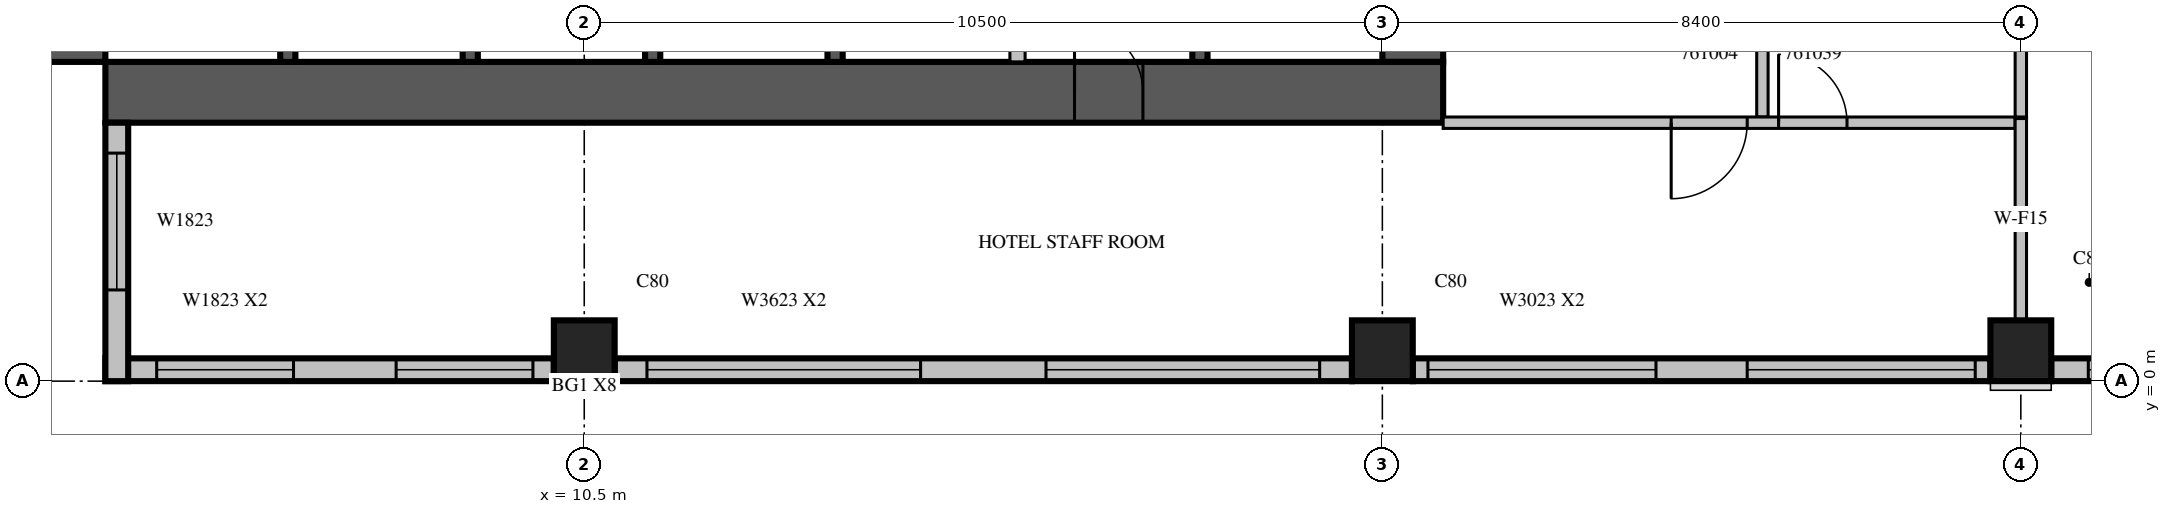
"""IFC4 building model, lengths in metres.
Left out: names, types, materials, properties, quantities, classifications, styles, units other than length and angle.
Written with IfcOpenShell. Run it as: python <this file> out.ifc"""

import sys

from ifc_helpers import new_model, si_unit, direction, frame, frame_2d, origin, origin_2d, place, context, subcontext, project, spatial, rectangle, extrude, source, transform, mapped, element, fill, save


model = new_model("IFC4")
c1 = context("Model", 3, precision=1e-05, world=origin(), true_north=direction((0.0, 1.0)))
c2 = subcontext(c1, "Body", "Model", "MODEL_VIEW")
j1 = project(units=[si_unit("LENGTHUNIT", "METRE"), si_unit("PLANEANGLEUNIT", "RADIAN")], contexts=[c1])
p1 = place(None, origin())
s1 = spatial("IfcSite", under=j1, at=p1, CompositionType="ELEMENT")
p2 = place(p1, origin())
s2 = spatial("IfcBuilding", under=s1, at=p2, CompositionType="ELEMENT")
p3 = place(p2, frame((0.0, 0.0, 265.2)))
s3 = spatial("IfcBuildingStorey", under=s2, at=p3, CompositionType="ELEMENT", Elevation=265.2)
m1 = source(origin(), c2, "Body", "SweptSolid", [
    extrude(rectangle(XDim=0.8, YDim=0.8, at=origin_2d()), origin(), (0.0, 0.0, 1.0), 3.8),
])
for number, where, z_axis, x_axis in (
    (1, (10.5, 0.4, 0.0), (0.0, 0.0, 1.0), (1.0, 0.0, 0.0)),
    (2, (21.0, 0.4, 0.0), (0.0, 0.0, 1.0), (1.0, 0.0, 0.0)),
    (3, (29.4, 0.4, 0.0), (0.0, 0.0, 1.0), (1.0, 0.0, 0.0)),
):
    element("IfcColumn", number, at=place(p3, frame(where, z_axis=z_axis, x_axis=x_axis)), inside=s3, PredefinedType="COLUMN", context=c2, shape_type="MappedRepresentation", body=[
        mapped(m1, transform((0.0, 0.0, 0.0), scale=1.0)),
    ])
m2 = source(origin(), c2, "Body", "SweptSolid", [
    extrude(rectangle(XDim=17.6, YDim=0.8, at=frame_2d((8.8, 0.0))), origin(), (0.0, 0.0, 1.0), 3.8),
])
p4 = place(p3, frame((3.8, 4.2, 0.0), z_axis=(0.0, 0.0, 1.0), x_axis=(0.0, 1.0, 0.0)))
e4 = element("IfcWall", 4, at=p4, inside=s3, PredefinedType="SHEAR", context=c2, shape_type="MappedRepresentation", body=[
    mapped(m2, transform((0.0, 0.0, 0.0), scale=1.0)),
])
m3 = source(origin(), c2, "Body", "SweptSolid", [
    extrude(rectangle(XDim=2.2, YDim=2.1, at=frame_2d((1.1, 1.05))), frame((0.0, 0.41, 0.0), z_axis=(0.0, -1.0, 0.0), x_axis=(1.0, 0.0, 0.0)), (0.0, 0.0, 1.0), 0.82),
])
p5 = place(p4, frame((4.2, 0.0, 0.0)))
e5 = element("IfcOpeningElement", 5, at=p5, cuts=e4, PredefinedType="OPENING", context=c2, shape_type="MappedRepresentation", body=[
    mapped(m3, transform((0.0, 0.0, 0.0), scale=1.0)),
])
m4 = source(origin(), c2, "Body", "SweptSolid", [
    extrude(rectangle(XDim=0.9, YDim=2.1, at=frame_2d((0.45, 1.05))), frame((0.0, 0.41, 0.0), z_axis=(0.0, -1.0, 0.0), x_axis=(1.0, 0.0, 0.0)), (0.0, 0.0, 1.0), 0.82),
])
p6 = place(p4, frame((10.95, 0.0, 0.0)))
e6 = element("IfcOpeningElement", 6, at=p6, cuts=e4, PredefinedType="OPENING", context=c2, shape_type="MappedRepresentation", body=[
    mapped(m4, transform((0.0, 0.0, 0.0), scale=1.0)),
])
m5 = source(origin(), c2, "Body", "SweptSolid", [
    extrude(rectangle(XDim=16.8, YDim=0.8, at=frame_2d((8.4, 0.0))), origin(), (0.0, 0.0, 1.0), 3.8),
])
p7 = place(p3, frame((21.4, 4.2, 0.0), z_axis=(0.0, 0.0, 1.0), x_axis=(0.0, 1.0, 0.0)))
e7 = element("IfcWall", 7, at=p7, inside=s3, PredefinedType="SHEAR", context=c2, shape_type="MappedRepresentation", body=[
    mapped(m5, transform((0.0, 0.0, 0.0), scale=1.0)),
])
p8 = place(p7, frame((4.2, 0.0, 0.0)))
e8 = element("IfcOpeningElement", 8, at=p8, cuts=e7, PredefinedType="OPENING", context=c2, shape_type="MappedRepresentation", body=[
    mapped(m3, transform((0.0, 0.0, 0.0), scale=1.0)),
])
m6 = source(origin(), c2, "Body", "SweptSolid", [
    extrude(rectangle(XDim=1.2, YDim=2.1, at=frame_2d((0.6, 1.05))), frame((0.0, 0.41, 0.0), z_axis=(0.0, -1.0, 0.0), x_axis=(1.0, 0.0, 0.0)), (0.0, 0.0, 1.0), 0.82),
])
p9 = place(p7, frame((14.7, 0.0, 0.0)))
e9 = element("IfcOpeningElement", 9, at=p9, cuts=e7, PredefinedType="OPENING", context=c2, shape_type="MappedRepresentation", body=[
    mapped(m6, transform((0.0, 0.0, 0.0), scale=1.0)),
])
p10 = place(p3, frame((4.2, 3.8, 0.0), z_axis=(0.0, 0.0, 1.0), x_axis=(1.0, 0.0, 0.0)))
e10 = element("IfcWall", 10, at=p10, inside=s3, PredefinedType="SHEAR", context=c2, shape_type="MappedRepresentation", body=[
    mapped(m2, transform((0.0, 0.0, 0.0), scale=1.0)),
])
p11 = place(p10, frame((12.75, 0.0, 0.0)))
e11 = element("IfcOpeningElement", 11, at=p11, cuts=e10, PredefinedType="OPENING", context=c2, shape_type="MappedRepresentation", body=[
    mapped(m4, transform((0.0, 0.0, 0.0), scale=1.0)),
])
m7 = source(origin(), c2, "Body", "SweptSolid", [
    extrude(rectangle(XDim=5.9, YDim=0.3, at=frame_2d((2.95, 0.0))), origin(), (0.0, 0.0, 1.0), 3.4),
])
p12 = place(p3, frame((4.2, 0.15, 0.0), z_axis=(0.0, 0.0, 1.0), x_axis=(1.0, 0.0, 0.0)))
e12 = element("IfcWall", 12, at=p12, inside=s3, PredefinedType="STANDARD", context=c2, shape_type="MappedRepresentation", body=[
    mapped(m7, transform((0.0, 0.0, 0.0), scale=1.0)),
])
m8 = source(origin(), c2, "Body", "SweptSolid", [
    extrude(rectangle(XDim=1.8, YDim=2.3, at=frame_2d((0.9, 1.15))), frame((0.0, 0.16, 0.0), z_axis=(0.0, -1.0, 0.0), x_axis=(1.0, 0.0, 0.0)), (0.0, 0.0, 1.0), 0.32),
])
p13 = place(p12, frame((0.675, 0.0, 0.6)))
e13 = element("IfcOpeningElement", 13, at=p13, cuts=e12, PredefinedType="OPENING", context=c2, shape_type="MappedRepresentation", body=[
    mapped(m8, transform((0.0, 0.0, 0.0), scale=1.0)),
])
p14 = place(p12, frame((3.825, 0.0, 0.6)))
e14 = element("IfcOpeningElement", 14, at=p14, cuts=e12, PredefinedType="OPENING", context=c2, shape_type="MappedRepresentation", body=[
    mapped(m8, transform((0.0, 0.0, 0.0), scale=1.0)),
])
m9 = source(origin(), c2, "Body", "SweptSolid", [
    extrude(rectangle(XDim=9.7, YDim=0.3, at=frame_2d((4.85, 0.0))), origin(), (0.0, 0.0, 1.0), 3.4),
])
p15 = place(p3, frame((10.9, 0.15, 0.0), z_axis=(0.0, 0.0, 1.0), x_axis=(1.0, 0.0, 0.0)))
e15 = element("IfcWall", 15, at=p15, inside=s3, PredefinedType="STANDARD", context=c2, shape_type="MappedRepresentation", body=[
    mapped(m9, transform((0.0, 0.0, 0.0), scale=1.0)),
])
m10 = source(origin(), c2, "Body", "SweptSolid", [
    extrude(rectangle(XDim=3.6, YDim=2.3, at=frame_2d((1.8, 1.15))), frame((0.0, 0.16, 0.0), z_axis=(0.0, -1.0, 0.0), x_axis=(1.0, 0.0, 0.0)), (0.0, 0.0, 1.0), 0.32),
])
p16 = place(p15, frame((0.425, 0.0, 0.6)))
e16 = element("IfcOpeningElement", 16, at=p16, cuts=e15, PredefinedType="OPENING", context=c2, shape_type="MappedRepresentation", body=[
    mapped(m10, transform((0.0, 0.0, 0.0), scale=1.0)),
])
p17 = place(p15, frame((5.675, 0.0, 0.6)))
e17 = element("IfcOpeningElement", 17, at=p17, cuts=e15, PredefinedType="OPENING", context=c2, shape_type="MappedRepresentation", body=[
    mapped(m10, transform((0.0, 0.0, 0.0), scale=1.0)),
])
m11 = source(origin(), c2, "Body", "SweptSolid", [
    extrude(rectangle(XDim=7.6, YDim=0.3, at=frame_2d((3.8, 0.0))), origin(), (0.0, 0.0, 1.0), 3.4),
])
p18 = place(p3, frame((21.4, 0.15, 0.0), z_axis=(0.0, 0.0, 1.0), x_axis=(1.0, 0.0, 0.0)))
e18 = element("IfcWall", 18, at=p18, inside=s3, PredefinedType="STANDARD", context=c2, shape_type="MappedRepresentation", body=[
    mapped(m11, transform((0.0, 0.0, 0.0), scale=1.0)),
])
m12 = source(origin(), c2, "Body", "SweptSolid", [
    extrude(rectangle(XDim=3.0, YDim=2.3, at=frame_2d((1.5, 1.15))), frame((0.0, 0.16, 0.0), z_axis=(0.0, -1.0, 0.0), x_axis=(1.0, 0.0, 0.0)), (0.0, 0.0, 1.0), 0.32),
])
p19 = place(p18, frame((0.2, 0.0, 0.6)))
e19 = element("IfcOpeningElement", 19, at=p19, cuts=e18, PredefinedType="OPENING", context=c2, shape_type="MappedRepresentation", body=[
    mapped(m12, transform((0.0, 0.0, 0.0), scale=1.0)),
])
p20 = place(p18, frame((4.4, 0.0, 0.6)))
e20 = element("IfcOpeningElement", 20, at=p20, cuts=e18, PredefinedType="OPENING", context=c2, shape_type="MappedRepresentation", body=[
    mapped(m12, transform((0.0, 0.0, 0.0), scale=1.0)),
])
p21 = place(p3, frame((29.8, 0.15, 0.0), z_axis=(0.0, 0.0, 1.0), x_axis=(1.0, 0.0, 0.0)))
e21 = element("IfcWall", 21, at=p21, inside=s3, PredefinedType="STANDARD", context=c2, shape_type="MappedRepresentation", body=[
    mapped(m11, transform((0.0, 0.0, 0.0), scale=1.0)),
])
m13 = source(origin(), c2, "Body", "SweptSolid", [
    extrude(rectangle(XDim=1.2, YDim=2.3, at=frame_2d((0.6, 1.15))), frame((0.0, 0.16, 0.0), z_axis=(0.0, -1.0, 0.0), x_axis=(1.0, 0.0, 0.0)), (0.0, 0.0, 1.0), 0.32),
])
p22 = place(p21, frame((0.487, 0.0, 0.6)))
e22 = element("IfcOpeningElement", 22, at=p22, cuts=e21, PredefinedType="OPENING", context=c2, shape_type="MappedRepresentation", body=[
    mapped(m13, transform((0.0, 0.0, 0.0), scale=1.0)),
])
p23 = place(p21, frame((6.013, 0.0, 0.6)))
e23 = element("IfcOpeningElement", 23, at=p23, cuts=e21, PredefinedType="OPENING", context=c2, shape_type="MappedRepresentation", body=[
    mapped(m13, transform((0.0, 0.0, 0.0), scale=1.0)),
])
m14 = source(origin(), c2, "Body", "SweptSolid", [
    extrude(rectangle(XDim=3.4, YDim=0.3, at=frame_2d((1.7, 0.0))), origin(), (0.0, 0.0, 1.0), 3.4),
])
p24 = place(p3, frame((4.35, 3.4, 0.0), z_axis=(0.0, 0.0, 1.0), x_axis=(0.0, -1.0, 0.0)))
e24 = element("IfcWall", 24, at=p24, inside=s3, PredefinedType="STANDARD", context=c2, shape_type="MappedRepresentation", body=[
    mapped(m14, transform((0.0, 0.0, 0.0), scale=1.0)),
])
p25 = place(p24, frame((0.4, 0.0, 0.6)))
e25 = element("IfcOpeningElement", 25, at=p25, cuts=e24, PredefinedType="OPENING", context=c2, shape_type="MappedRepresentation", body=[
    mapped(m8, transform((0.0, 0.0, 0.0), scale=1.0)),
])
m15 = source(origin(), c2, "Body", "SweptSolid", [
    extrude(rectangle(XDim=3.1, YDim=0.2, at=frame_2d((1.55, 0.0))), origin(), (0.0, 0.0, 1.0), 3.8),
])
for number, where, z_axis, x_axis in (
    (26, (6.6, 4.2, 0.0), (0.0, 0.0, 1.0), (0.0, 1.0, 0.0)),
    (27, (9.0, 4.2, 0.0), (0.0, 0.0, 1.0), (0.0, 1.0, 0.0)),
    (28, (11.4, 4.2, 0.0), (0.0, 0.0, 1.0), (0.0, 1.0, 0.0)),
):
    element("IfcWall", number, at=place(p3, frame(where, z_axis=z_axis, x_axis=x_axis)), inside=s3, PredefinedType="SOLIDWALL", context=c2, shape_type="MappedRepresentation", body=[
        mapped(m15, transform((0.0, 0.0, 0.0), scale=1.0)),
    ])
m16 = source(origin(), c2, "Body", "SweptSolid", [
    extrude(rectangle(XDim=3.1, YDim=0.2, at=frame_2d((1.55, 0.0))), origin(), (0.0, 0.0, 1.0), 3.4),
])
for number, where, z_axis, x_axis in (
    (29, (13.8, 4.2, 0.0), (0.0, 0.0, 1.0), (0.0, 1.0, 0.0)),
    (30, (18.6, 4.2, 0.0), (0.0, 0.0, 1.0), (0.0, 1.0, 0.0)),
):
    element("IfcWall", number, at=place(p3, frame(where, z_axis=z_axis, x_axis=x_axis)), inside=s3, PredefinedType="SOLIDWALL", context=c2, shape_type="MappedRepresentation", body=[
        mapped(m16, transform((0.0, 0.0, 0.0), scale=1.0)),
    ])
m17 = source(origin(), c2, "Body", "SweptSolid", [
    extrude(rectangle(XDim=3.1, YDim=0.2, at=frame_2d((1.55, 0.0))), origin(), (0.0, 0.0, 1.0), 3.4),
])
p26 = place(p3, frame((16.2, 4.2, 0.0), z_axis=(0.0, 0.0, 1.0), x_axis=(0.0, 1.0, 0.0)))
e31 = element("IfcWall", 31, at=p26, inside=s3, PredefinedType="PARTITIONING", context=c2, shape_type="MappedRepresentation", body=[
    mapped(m17, transform((0.0, 0.0, 0.0), scale=1.0)),
])
m18 = source(origin(), c2, "Body", "SweptSolid", [
    extrude(rectangle(XDim=11.225, YDim=0.15, at=frame_2d((5.612, 0.0))), origin(), (0.0, 0.0, 1.0), 3.4),
])
p27 = place(p3, frame((26.0, 14.7, 0.0), z_axis=(0.0, 0.0, 1.0), x_axis=(0.0, -1.0, 0.0)))
e32 = element("IfcWall", 32, at=p27, inside=s3, PredefinedType="PARTITIONING", context=c2, shape_type="MappedRepresentation", body=[
    mapped(m18, transform((0.0, 0.0, 0.0), scale=1.0)),
])
m19 = source(origin(), c2, "Body", "SweptSolid", [
    extrude(rectangle(XDim=0.9, YDim=2.1, at=frame_2d((0.45, 1.05))), frame((0.0, 0.085, 0.0), z_axis=(0.0, -1.0, 0.0), x_axis=(1.0, 0.0, 0.0)), (0.0, 0.0, 1.0), 0.17),
])
p28 = place(p27, frame((7.263, 0.0, 0.0)))
e33 = element("IfcOpeningElement", 33, at=p28, cuts=e32, PredefinedType="OPENING", context=c2, shape_type="MappedRepresentation", body=[
    mapped(m19, transform((0.0, 0.0, 0.0), scale=1.0)),
])
p29 = place(p27, frame((0.775, 0.0, 0.0)))
e34 = element("IfcOpeningElement", 34, at=p29, cuts=e32, PredefinedType="OPENING", context=c2, shape_type="MappedRepresentation", body=[
    mapped(m19, transform((0.0, 0.0, 0.0), scale=1.0)),
])
m20 = source(origin(), c2, "Body", "SweptSolid", [
    extrude(rectangle(XDim=6.626, YDim=0.15, at=frame_2d((3.313, 0.0))), origin(), (0.0, 0.0, 1.0), 3.4),
])
p30 = place(p3, frame((29.4, 3.475, 0.0), z_axis=(0.0, 0.0, 1.0), x_axis=(0.0, 1.0, 0.0)))
e35 = element("IfcWall", 35, at=p30, inside=s3, PredefinedType="PARTITIONING", context=c2, shape_type="MappedRepresentation", body=[
    mapped(m20, transform((0.0, 0.0, 0.0), scale=1.0)),
])
m21 = source(origin(), c2, "Body", "SweptSolid", [
    extrude(rectangle(XDim=7.525, YDim=0.15, at=frame_2d((3.763, 0.0))), origin(), (0.0, 0.0, 1.0), 3.4),
])
p31 = place(p3, frame((21.8, 3.4, 0.0), z_axis=(0.0, 0.0, 1.0), x_axis=(1.0, 0.0, 0.0)))
e36 = element("IfcWall", 36, at=p31, inside=s3, PredefinedType="PARTITIONING", context=c2, shape_type="MappedRepresentation", body=[
    mapped(m21, transform((0.0, 0.0, 0.0), scale=1.0)),
])
m22 = source(origin(), c2, "Body", "SweptSolid", [
    extrude(rectangle(XDim=1.0, YDim=2.1, at=frame_2d((0.5, 1.05))), frame((0.0, 0.085, 0.0), z_axis=(0.0, -1.0, 0.0), x_axis=(1.0, 0.0, 0.0)), (0.0, 0.0, 1.0), 0.17),
])
p32 = place(p31, frame((3.0, 0.0, 0.0)))
e37 = element("IfcOpeningElement", 37, at=p32, cuts=e36, PredefinedType="OPENING", context=c2, shape_type="MappedRepresentation", body=[
    mapped(m22, transform((0.0, 0.0, 0.0), scale=1.0)),
])
p33 = place(p31, frame((4.413, 0.0, 0.0)))
e38 = element("IfcOpeningElement", 38, at=p33, cuts=e36, PredefinedType="OPENING", context=c2, shape_type="MappedRepresentation", body=[
    mapped(m19, transform((0.0, 0.0, 0.0), scale=1.0)),
])
m23 = source(origin(), c2, "Body", "SweptSolid", [
    extrude(rectangle(XDim=2.656, YDim=0.15, at=frame_2d((1.328, 0.0))), origin(), (0.0, 0.0, 1.0), 3.4),
])
p34 = place(p3, frame((29.4, 0.799, 0.0), z_axis=(0.0, 0.0, 1.0), x_axis=(0.0, 1.0, 0.0)))
e39 = element("IfcWall", 39, at=p34, inside=s3, PredefinedType="PARTITIONING", context=c2, shape_type="MappedRepresentation", body=[
    mapped(m23, transform((0.0, 0.0, 0.0), scale=1.0)),
])
m24 = source(origin(), c2, "Body", "SweptSolid", [
    extrude(rectangle(XDim=1.8, YDim=2.3, at=frame_2d((0.9, 1.15))), frame((0.0, 0.03, 0.0), z_axis=(0.0, -1.0, 0.0), x_axis=(1.0, 0.0, 0.0)), (0.0, 0.0, 1.0), 0.06),
])
p35 = place(p13, origin())
e40 = element("IfcWindow", 40, at=p35, inside=s3, PartitioningType="SINGLE_PANEL", PredefinedType="WINDOW", context=c2, shape_type="MappedRepresentation", body=[
    mapped(m24, transform((0.0, 0.0, 0.0), scale=1.0)),
])
fill(e13, e40)
p36 = place(p14, origin())
e41 = element("IfcWindow", 41, at=p36, inside=s3, PartitioningType="SINGLE_PANEL", PredefinedType="WINDOW", context=c2, shape_type="MappedRepresentation", body=[
    mapped(m24, transform((0.0, 0.0, 0.0), scale=1.0)),
])
fill(e14, e41)
m25 = source(origin(), c2, "Body", "SweptSolid", [
    extrude(rectangle(XDim=3.6, YDim=2.3, at=frame_2d((1.8, 1.15))), frame((0.0, 0.03, 0.0), z_axis=(0.0, -1.0, 0.0), x_axis=(1.0, 0.0, 0.0)), (0.0, 0.0, 1.0), 0.06),
])
p37 = place(p16, origin())
e42 = element("IfcWindow", 42, at=p37, inside=s3, PartitioningType="SINGLE_PANEL", PredefinedType="WINDOW", context=c2, shape_type="MappedRepresentation", body=[
    mapped(m25, transform((0.0, 0.0, 0.0), scale=1.0)),
])
fill(e16, e42)
p38 = place(p17, origin())
e43 = element("IfcWindow", 43, at=p38, inside=s3, PartitioningType="SINGLE_PANEL", PredefinedType="WINDOW", context=c2, shape_type="MappedRepresentation", body=[
    mapped(m25, transform((0.0, 0.0, 0.0), scale=1.0)),
])
fill(e17, e43)
m26 = source(origin(), c2, "Body", "SweptSolid", [
    extrude(rectangle(XDim=3.0, YDim=2.3, at=frame_2d((1.5, 1.15))), frame((0.0, 0.03, 0.0), z_axis=(0.0, -1.0, 0.0), x_axis=(1.0, 0.0, 0.0)), (0.0, 0.0, 1.0), 0.06),
])
p39 = place(p19, origin())
e44 = element("IfcWindow", 44, at=p39, inside=s3, PartitioningType="SINGLE_PANEL", PredefinedType="WINDOW", context=c2, shape_type="MappedRepresentation", body=[
    mapped(m26, transform((0.0, 0.0, 0.0), scale=1.0)),
])
fill(e19, e44)
p40 = place(p20, origin())
e45 = element("IfcWindow", 45, at=p40, inside=s3, PartitioningType="SINGLE_PANEL", PredefinedType="WINDOW", context=c2, shape_type="MappedRepresentation", body=[
    mapped(m26, transform((0.0, 0.0, 0.0), scale=1.0)),
])
fill(e20, e45)
m27 = source(origin(), c2, "Body", "SweptSolid", [
    extrude(rectangle(XDim=1.2, YDim=2.3, at=frame_2d((0.6, 1.15))), frame((0.0, 0.03, 0.0), z_axis=(0.0, -1.0, 0.0), x_axis=(1.0, 0.0, 0.0)), (0.0, 0.0, 1.0), 0.06),
])
p41 = place(p22, origin())
e46 = element("IfcWindow", 46, at=p41, inside=s3, PartitioningType="SINGLE_PANEL", PredefinedType="WINDOW", context=c2, shape_type="MappedRepresentation", body=[
    mapped(m27, transform((0.0, 0.0, 0.0), scale=1.0)),
])
fill(e22, e46)
p42 = place(p25, origin())
e47 = element("IfcWindow", 47, at=p42, inside=s3, PartitioningType="SINGLE_PANEL", PredefinedType="WINDOW", context=c2, shape_type="MappedRepresentation", body=[
    mapped(m24, transform((0.0, 0.0, 0.0), scale=1.0)),
])
fill(e25, e47)
m28 = source(origin(), c2, "Body", "SweptSolid", [
    extrude(rectangle(XDim=0.9, YDim=2.1, at=frame_2d((0.45, 1.05))), frame((0.0, 0.025, 0.0), z_axis=(0.0, -1.0, 0.0), x_axis=(1.0, 0.0, 0.0)), (0.0, 0.0, 1.0), 0.05),
])
p43 = place(p11, origin())
e48 = element("IfcDoor", 48, at=p43, inside=s3, OperationType="SINGLE_SWING_LEFT", PredefinedType="DOOR", context=c2, shape_type="MappedRepresentation", body=[
    mapped(m28, transform((0.0, 0.0, 0.0), scale=1.0)),
])
fill(e11, e48)
m29 = source(origin(), c2, "Body", "SweptSolid", [
    extrude(rectangle(XDim=1.0, YDim=2.1, at=frame_2d((0.5, 1.05))), frame((0.0, 0.025, 0.0), z_axis=(0.0, -1.0, 0.0), x_axis=(1.0, 0.0, 0.0)), (0.0, 0.0, 1.0), 0.05),
])
p44 = place(p32, origin())
e49 = element("IfcDoor", 49, at=p44, inside=s3, OperationType="SINGLE_SWING_RIGHT", PredefinedType="DOOR", context=c2, shape_type="MappedRepresentation", body=[
    mapped(m29, transform((0.0, 0.0, 0.0), scale=1.0)),
])
fill(e37, e49)
p45 = place(p33, origin())
e50 = element("IfcDoor", 50, at=p45, inside=s3, OperationType="SINGLE_SWING_LEFT", PredefinedType="DOOR", context=c2, shape_type="MappedRepresentation", body=[
    mapped(m28, transform((0.0, 0.0, 0.0), scale=1.0)),
])
fill(e38, e50)
save(model, sys.argv[1])
